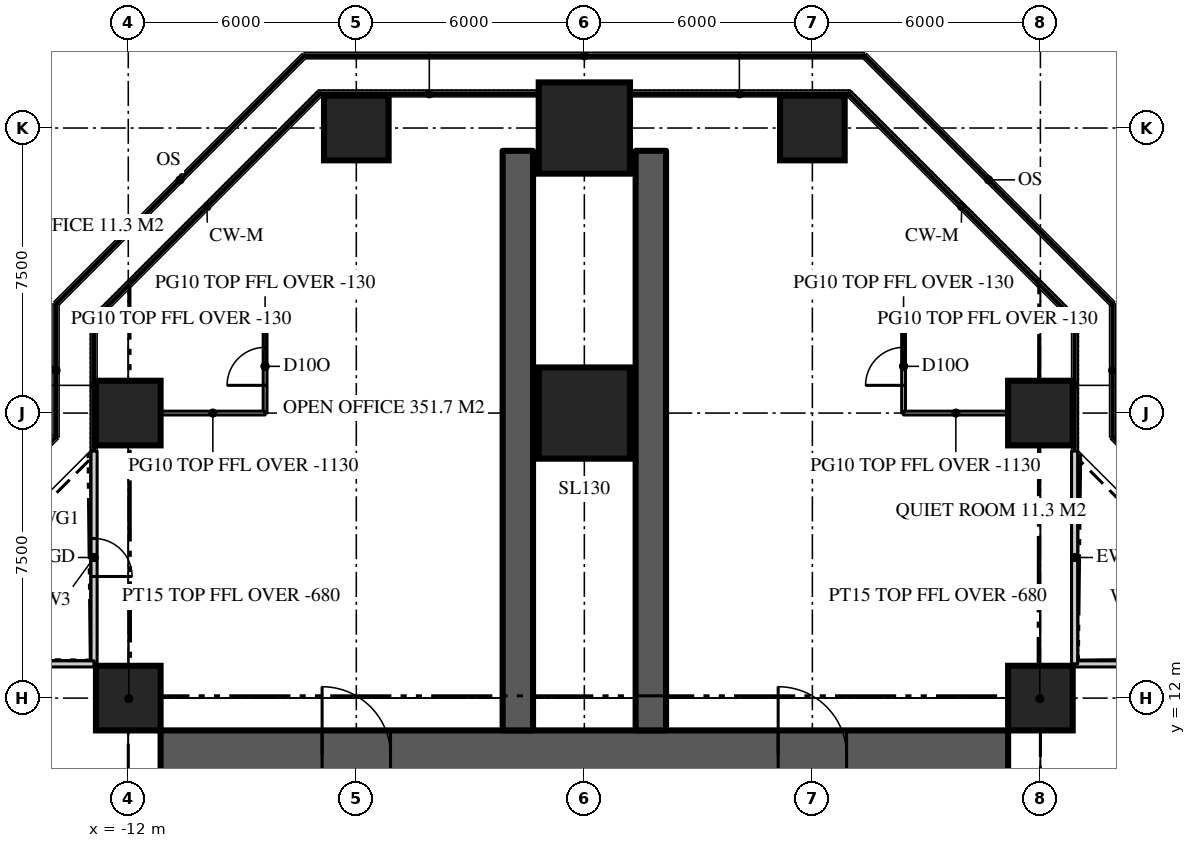
"""IFC4 building model, lengths in metres.
Left out: names, types, materials, properties, quantities, classifications, styles, units other than length and angle.
Written with IfcOpenShell. Run it as: python <this file> out.ifc"""

import sys

from ifc_helpers import new_model, si_unit, direction, frame, frame_2d, origin, origin_2d, place, context, subcontext, project, spatial, rectangle, extrude, element, fill, save


model = new_model("IFC4")
c1 = context("Model", 3, precision=1e-05, world=origin(), true_north=direction((0.0, 1.0)))
c2 = subcontext(c1, "Body", "Model", "MODEL_VIEW")
j1 = project(units=[si_unit("LENGTHUNIT", "METRE"), si_unit("PLANEANGLEUNIT", "RADIAN")], contexts=[c1])
p1 = place(None, origin())
s1 = spatial("IfcSite", under=j1, at=p1, CompositionType="ELEMENT")
p2 = place(p1, origin())
s2 = spatial("IfcBuilding", under=s1, at=p2, CompositionType="ELEMENT")
p3 = place(p2, frame((0.0, 0.0, 171.0)))
s3 = spatial("IfcBuildingStorey", under=s2, at=p3, CompositionType="ELEMENT", Elevation=171.0)
p4 = place(p3, frame((-11.15, 10.5, 0.0), z_axis=(0.0, 0.0, 1.0), x_axis=(1.0, 0.0, 0.0)))
e1 = element("IfcWall", 1, at=p4, inside=s3, PredefinedType="SHEAR", context=c2, shape_type="SweptSolid", body=[
    extrude(rectangle(XDim=22.3, YDim=1.3, at=frame_2d((11.15, 0.0))), origin(), (0.0, 0.0, 1.0), 3.9),
])
p5 = place(p4, frame((4.25, 0.0, 0.0)))
e2 = element("IfcOpeningElement", 2, at=p5, cuts=e1, PredefinedType="OPENING", context=c2, shape_type="SweptSolid", body=[
    extrude(rectangle(XDim=1.8, YDim=2.2, at=frame_2d((0.9, 1.1))), frame((0.0, 0.66, 0.0), z_axis=(0.0, -1.0, 0.0), x_axis=(1.0, 0.0, 0.0)), (0.0, 0.0, 1.0), 1.32),
])
p6 = place(p4, frame((16.25, 0.0, 0.0)))
e3 = element("IfcOpeningElement", 3, at=p6, cuts=e1, PredefinedType="OPENING", context=c2, shape_type="SweptSolid", body=[
    extrude(rectangle(XDim=1.8, YDim=2.2, at=frame_2d((0.9, 1.1))), frame((0.0, 0.66, 0.0), z_axis=(0.0, -1.0, 0.0), x_axis=(1.0, 0.0, 0.0)), (0.0, 0.0, 1.0), 1.32),
])
for number, where, z_axis, x_axis in (
    (4, (1.75, 11.15, 0.0), (0.0, 0.0, 1.0), (0.0, 1.0, 0.0)),
    (5, (-1.75, 11.15, 0.0), (0.0, 0.0, 1.0), (0.0, 1.0, 0.0)),
):
    element("IfcWall", number, at=place(p3, frame(where, z_axis=z_axis, x_axis=x_axis)), inside=s3, PredefinedType="SHEAR", context=c2, shape_type="SweptSolid", body=[
        extrude(rectangle(XDim=15.25, YDim=0.8, at=frame_2d((7.625, 0.0))), origin(), (0.0, 0.0, 1.0), 3.9),
    ])
for number, where, z_axis, x_axis in (
    (6, (-12.0, 12.0, 0.0), (0.0, 0.0, 1.0), (1.0, 0.0, 0.0)),
    (7, (12.0, 12.0, 0.0), (0.0, 0.0, 1.0), (1.0, 0.0, 0.0)),
    (8, (-12.0, 19.5, 0.0), (0.0, 0.0, 1.0), (1.0, 0.0, 0.0)),
):
    element("IfcColumn", number, at=place(p3, frame(where, z_axis=z_axis, x_axis=x_axis)), inside=s3, PredefinedType="COLUMN", context=c2, shape_type="SweptSolid", body=[
        extrude(rectangle(XDim=1.7, YDim=1.7, at=origin_2d()), origin(), (0.0, 0.0, 1.0), 3.9),
    ])
p7 = place(p3, frame((0.0, 19.5, 0.0), z_axis=(0.0, 0.0, 1.0), x_axis=(1.0, 0.0, 0.0)))
e9 = element("IfcColumn", 9, at=p7, inside=s3, PredefinedType="COLUMN", context=c2, shape_type="SweptSolid", body=[
    extrude(rectangle(XDim=2.4, YDim=2.4, at=origin_2d()), origin(), (0.0, 0.0, 1.0), 3.9),
])
for number, where, z_axis, x_axis in (
    (10, (12.0, 19.5, 0.0), (0.0, 0.0, 1.0), (1.0, 0.0, 0.0)),
    (11, (-6.0, 27.0, 0.0), (0.0, 0.0, 1.0), (1.0, 0.0, 0.0)),
):
    element("IfcColumn", number, at=place(p3, frame(where, z_axis=z_axis, x_axis=x_axis)), inside=s3, PredefinedType="COLUMN", context=c2, shape_type="SweptSolid", body=[
        extrude(rectangle(XDim=1.7, YDim=1.7, at=origin_2d()), origin(), (0.0, 0.0, 1.0), 3.9),
    ])
p8 = place(p3, frame((0.0, 27.0, 0.0), z_axis=(0.0, 0.0, 1.0), x_axis=(1.0, 0.0, 0.0)))
e12 = element("IfcColumn", 12, at=p8, inside=s3, PredefinedType="COLUMN", context=c2, shape_type="SweptSolid", body=[
    extrude(rectangle(XDim=2.4, YDim=2.4, at=origin_2d()), origin(), (0.0, 0.0, 1.0), 3.9),
])
p9 = place(p3, frame((6.0, 27.0, 0.0), z_axis=(0.0, 0.0, 1.0), x_axis=(1.0, 0.0, 0.0)))
e13 = element("IfcColumn", 13, at=p9, inside=s3, PredefinedType="COLUMN", context=c2, shape_type="SweptSolid", body=[
    extrude(rectangle(XDim=1.7, YDim=1.7, at=origin_2d()), origin(), (0.0, 0.0, 1.0), 3.9),
])
p10 = place(p3, frame((18.5, 12.9, 0.0), z_axis=(0.0, 0.0, 1.0), x_axis=(-1.0, 0.0, 0.0)))
e14 = element("IfcWall", 14, at=p10, inside=s3, PredefinedType="SOLIDWALL", context=c2, shape_type="SweptSolid", body=[
    extrude(rectangle(XDim=5.6, YDim=0.16, at=frame_2d((2.8, 0.0))), origin(), (0.0, 0.0, 1.0), 3.77),
])
p11 = place(p10, frame((2.3, 0.0, 0.0)))
e15 = element("IfcOpeningElement", 15, at=p11, cuts=e14, PredefinedType="OPENING", context=c2, shape_type="SweptSolid", body=[
    extrude(rectangle(XDim=1.0, YDim=2.2, at=frame_2d((0.5, 1.1))), frame((0.0, 0.09, 0.0), z_axis=(0.0, -1.0, 0.0), x_axis=(1.0, 0.0, 0.0)), (0.0, 0.0, 1.0), 0.18),
])
p12 = place(p3, frame((12.9, 12.9, 0.0), z_axis=(0.0, 0.0, 1.0), x_axis=(0.0, 1.0, 0.0)))
e16 = element("IfcWall", 16, at=p12, inside=s3, PredefinedType="SOLIDWALL", context=c2, shape_type="SweptSolid", body=[
    extrude(rectangle(XDim=5.6, YDim=0.16, at=frame_2d((2.8, 0.0))), origin(), (0.0, 0.0, 1.0), 3.77),
])
p13 = place(p3, frame((-12.9, 18.5, 0.0), z_axis=(0.0, 0.0, 1.0), x_axis=(0.0, -1.0, 0.0)))
e17 = element("IfcWall", 17, at=p13, inside=s3, PredefinedType="SOLIDWALL", context=c2, shape_type="SweptSolid", body=[
    extrude(rectangle(XDim=5.6, YDim=0.16, at=frame_2d((2.8, 0.0))), origin(), (0.0, 0.0, 1.0), 3.77),
])
p14 = place(p13, frame((2.3, 0.0, 0.0)))
e18 = element("IfcOpeningElement", 18, at=p14, cuts=e17, PredefinedType="OPENING", context=c2, shape_type="SweptSolid", body=[
    extrude(rectangle(XDim=1.0, YDim=2.2, at=frame_2d((0.5, 1.1))), frame((0.0, 0.09, 0.0), z_axis=(0.0, -1.0, 0.0), x_axis=(1.0, 0.0, 0.0)), (0.0, 0.0, 1.0), 0.18),
])
p15 = place(p3, frame((-12.9, 12.9, 0.0), z_axis=(0.0, 0.0, 1.0), x_axis=(-1.0, 0.0, 0.0)))
e19 = element("IfcWall", 19, at=p15, inside=s3, PredefinedType="SOLIDWALL", context=c2, shape_type="SweptSolid", body=[
    extrude(rectangle(XDim=5.6, YDim=0.16, at=frame_2d((2.8, 0.0))), origin(), (0.0, 0.0, 1.0), 3.77),
])
p16 = place(p3, frame((-8.4, 19.5, 0.0), z_axis=(0.0, 0.0, 1.0), x_axis=(0.0, 1.0, 0.0)))
e20 = element("IfcWall", 20, at=p16, inside=s3, PredefinedType="PARTITIONING", context=c2, shape_type="SweptSolid", body=[
    extrude(rectangle(XDim=2.459, YDim=0.1, at=frame_2d((1.229, 0.0))), origin(), (0.0, 0.0, 1.0), 3.77),
])
p17 = place(p16, frame((0.729, 0.0, 0.0)))
e21 = element("IfcOpeningElement", 21, at=p17, cuts=e20, PredefinedType="OPENING", context=c2, shape_type="SweptSolid", body=[
    extrude(rectangle(XDim=1.0, YDim=2.2, at=frame_2d((0.5, 1.1))), frame((0.0, 0.06, 0.0), z_axis=(0.0, -1.0, 0.0), x_axis=(1.0, 0.0, 0.0)), (0.0, 0.0, 1.0), 0.12),
])
p18 = place(p3, frame((-8.4, 19.5, 0.0), z_axis=(0.0, 0.0, 1.0), x_axis=(-1.0, 0.0, 0.0)))
e22 = element("IfcWall", 22, at=p18, inside=s3, PredefinedType="PARTITIONING", context=c2, shape_type="SweptSolid", body=[
    extrude(rectangle(XDim=2.75, YDim=0.1, at=frame_2d((1.375, 0.0))), origin(), (0.0, 0.0, 1.0), 2.77),
])
p19 = place(p3, frame((-8.4, 21.959, 0.0), z_axis=(0.0, 0.0, 1.0), x_axis=(-1.0, 0.0, 0.0)))
e23 = element("IfcWall", 23, at=p19, inside=s3, PredefinedType="PARTITIONING", context=c2, shape_type="SweptSolid", body=[
    extrude(rectangle(XDim=4.42, YDim=0.1, at=frame_2d((2.21, 0.0))), origin(), (0.0, 0.0, 1.0), 3.77),
])
p20 = place(p3, frame((8.4, 19.5, 0.0), z_axis=(0.0, 0.0, 1.0), x_axis=(0.0, 1.0, 0.0)))
e24 = element("IfcWall", 24, at=p20, inside=s3, PredefinedType="PARTITIONING", context=c2, shape_type="SweptSolid", body=[
    extrude(rectangle(XDim=2.459, YDim=0.1, at=frame_2d((1.229, 0.0))), origin(), (0.0, 0.0, 1.0), 3.77),
])
p21 = place(p20, frame((0.729, 0.0, 0.0)))
e25 = element("IfcOpeningElement", 25, at=p21, cuts=e24, PredefinedType="OPENING", context=c2, shape_type="SweptSolid", body=[
    extrude(rectangle(XDim=1.0, YDim=2.2, at=frame_2d((0.5, 1.1))), frame((0.0, 0.06, 0.0), z_axis=(0.0, -1.0, 0.0), x_axis=(1.0, 0.0, 0.0)), (0.0, 0.0, 1.0), 0.12),
])
p22 = place(p3, frame((8.4, 19.5, 0.0), z_axis=(0.0, 0.0, 1.0), x_axis=(1.0, 0.0, 0.0)))
e26 = element("IfcWall", 26, at=p22, inside=s3, PredefinedType="PARTITIONING", context=c2, shape_type="SweptSolid", body=[
    extrude(rectangle(XDim=2.75, YDim=0.1, at=frame_2d((1.375, 0.0))), origin(), (0.0, 0.0, 1.0), 2.77),
])
p23 = place(p3, frame((8.4, 21.959, 0.0), z_axis=(0.0, 0.0, 1.0), x_axis=(1.0, 0.0, 0.0)))
e27 = element("IfcWall", 27, at=p23, inside=s3, PredefinedType="PARTITIONING", context=c2, shape_type="SweptSolid", body=[
    extrude(rectangle(XDim=4.42, YDim=0.1, at=frame_2d((2.21, 0.0))), origin(), (0.0, 0.0, 1.0), 3.77),
])
for number, where, z_axis, x_axis in (
    (28, (11.15, 11.15, 0.0), (0.0, 0.0, 1.0), (0.707, 0.707, 0.0)),
    (29, (-11.15, 11.15, 0.0), (0.0, 0.0, 1.0), (-0.707, 0.707, 0.0)),
):
    element("IfcWall", number, at=place(p3, frame(where, z_axis=z_axis, x_axis=x_axis)), inside=s3, PredefinedType="PARTITIONING", context=c2, shape_type="SweptSolid", body=[
        extrude(rectangle(XDim=2.362, YDim=0.15, at=frame_2d((1.181, 0.0))), origin(), (0.0, 0.0, 1.0), 3.22),
    ])
p24 = place(p14, origin())
e30 = element("IfcDoor", 30, at=p24, inside=s3, OperationType="SINGLE_SWING_RIGHT", PredefinedType="DOOR", context=c2, shape_type="SweptSolid", body=[
    extrude(rectangle(XDim=1.0, YDim=2.2, at=frame_2d((0.5, 1.1))), frame((0.0, 0.025, 0.0), z_axis=(0.0, -1.0, 0.0), x_axis=(1.0, 0.0, 0.0)), (0.0, 0.0, 1.0), 0.05),
])
fill(e18, e30)
p25 = place(p5, origin())
e31 = element("IfcDoor", 31, at=p25, inside=s3, OperationType="DOUBLE_DOOR_DOUBLE_SWING", PredefinedType="DOOR", context=c2, shape_type="SweptSolid", body=[
    extrude(rectangle(XDim=1.8, YDim=2.2, at=frame_2d((0.9, 1.1))), frame((0.0, 0.025, 0.0), z_axis=(0.0, -1.0, 0.0), x_axis=(1.0, 0.0, 0.0)), (0.0, 0.0, 1.0), 0.05),
])
fill(e2, e31)
p26 = place(p6, origin())
e32 = element("IfcDoor", 32, at=p26, inside=s3, OperationType="DOUBLE_DOOR_DOUBLE_SWING", PredefinedType="DOOR", context=c2, shape_type="SweptSolid", body=[
    extrude(rectangle(XDim=1.8, YDim=2.2, at=frame_2d((0.9, 1.1))), frame((0.0, 0.025, 0.0), z_axis=(0.0, -1.0, 0.0), x_axis=(1.0, 0.0, 0.0)), (0.0, 0.0, 1.0), 0.05),
])
fill(e3, e32)
p27 = place(p17, origin())
e33 = element("IfcDoor", 33, at=p27, inside=s3, OperationType="SINGLE_SWING_LEFT", PredefinedType="DOOR", context=c2, shape_type="SweptSolid", body=[
    extrude(rectangle(XDim=1.0, YDim=2.2, at=frame_2d((0.5, 1.1))), frame((0.0, 0.025, 0.0), z_axis=(0.0, -1.0, 0.0), x_axis=(1.0, 0.0, 0.0)), (0.0, 0.0, 1.0), 0.05),
])
fill(e21, e33)
p28 = place(p21, origin())
e34 = element("IfcDoor", 34, at=p28, inside=s3, OperationType="SINGLE_SWING_LEFT", PredefinedType="DOOR", context=c2, shape_type="SweptSolid", body=[
    extrude(rectangle(XDim=1.0, YDim=2.2, at=frame_2d((0.5, 1.1))), frame((0.0, 0.025, 0.0), z_axis=(0.0, -1.0, 0.0), x_axis=(1.0, 0.0, 0.0)), (0.0, 0.0, 1.0), 0.05),
])
fill(e25, e34)
save(model, sys.argv[1])
